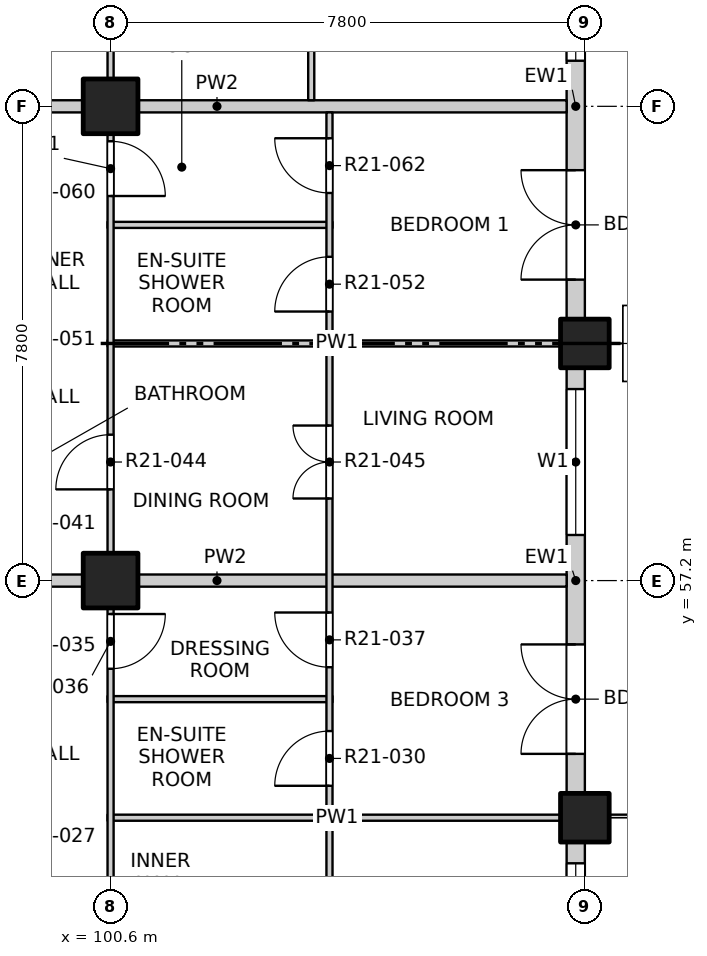
"""IFC4 building model, lengths in metres.
Left out: names, types, materials, properties, quantities, classifications, styles, units other than length and angle.
Written with IfcOpenShell. Run it as: python <this file> out.ifc"""

import sys

from ifc_helpers import new_model, si_unit, direction, frame, frame_2d, origin, origin_2d, place, context, subcontext, project, spatial, rectangle, extrude, element, fill, save


model = new_model("IFC4")
c1 = context("Model", 3, precision=1e-05, world=origin(), true_north=direction((0.0, 1.0)))
c2 = subcontext(c1, "Body", "Model", "MODEL_VIEW")
j1 = project(units=[si_unit("LENGTHUNIT", "METRE"), si_unit("PLANEANGLEUNIT", "RADIAN")], contexts=[c1])
p1 = place(None, origin())
s1 = spatial("IfcSite", under=j1, at=p1, CompositionType="ELEMENT")
p2 = place(p1, origin())
s2 = spatial("IfcBuilding", under=s1, at=p2, CompositionType="ELEMENT")
p3 = place(p2, frame((0.0, 0.0, 221.1)))
s3 = spatial("IfcBuildingStorey", under=s2, at=p3, CompositionType="ELEMENT", Elevation=221.1)
for number, where, z_axis, x_axis in (
    (1, (108.4, 53.3, -0.25), (0.0, 0.0, 1.0), (1.0, 0.0, 0.0)),
    (2, (108.4, 61.1, -0.25), (0.0, 0.0, 1.0), (1.0, 0.0, 0.0)),
):
    element("IfcColumn", number, at=place(p3, frame(where, z_axis=z_axis, x_axis=x_axis)), inside=s3, PredefinedType="COLUMN", context=c2, shape_type="SweptSolid", body=[
        extrude(rectangle(XDim=0.8, YDim=0.8, at=origin_2d()), origin(), (0.0, 0.0, 1.0), 3.4),
    ])
for number, where, z_axis, x_axis in (
    (3, (100.6, 57.2, -0.25), (0.0, 0.0, 1.0), (1.0, 0.0, 0.0)),
    (4, (100.6, 65.0, -0.25), (0.0, 0.0, 1.0), (1.0, 0.0, 0.0)),
):
    element("IfcColumn", number, at=place(p3, frame(where, z_axis=z_axis, x_axis=x_axis)), inside=s3, PredefinedType="COLUMN", context=c2, shape_type="SweptSolid", body=[
        extrude(rectangle(XDim=0.9, YDim=0.9, at=origin_2d()), origin(), (0.0, 0.0, 1.0), 3.4),
    ])
p4 = place(p3, frame((108.25, 45.5, 0.0), z_axis=(0.0, 0.0, 1.0), x_axis=(0.0, 1.0, 0.0)))
e5 = element("IfcWall", 5, at=p4, inside=s3, PredefinedType="SOLIDWALL", context=c2, shape_type="SweptSolid", body=[
    extrude(rectangle(XDim=7.4, YDim=0.3, at=frame_2d((3.7, 0.0))), origin(), (0.0, 0.0, 1.0), 2.7),
])
p5 = place(p4, frame((0.75, 0.0, 0.9)))
e6 = element("IfcOpeningElement", 6, at=p5, cuts=e5, PredefinedType="OPENING", context=c2, shape_type="SweptSolid", body=[
    extrude(rectangle(XDim=2.4, YDim=1.8, at=frame_2d((1.2, 0.9))), frame((0.0, 0.16, 0.0), z_axis=(0.0, -1.0, 0.0), x_axis=(1.0, 0.0, 0.0)), (0.0, 0.0, 1.0), 0.32),
])
p6 = place(p4, frame((4.65, 0.0, 0.9)))
e7 = element("IfcOpeningElement", 7, at=p6, cuts=e5, PredefinedType="OPENING", context=c2, shape_type="SweptSolid", body=[
    extrude(rectangle(XDim=2.4, YDim=1.8, at=frame_2d((1.2, 0.9))), frame((0.0, 0.16, 0.0), z_axis=(0.0, -1.0, 0.0), x_axis=(1.0, 0.0, 0.0)), (0.0, 0.0, 1.0), 0.32),
])
p7 = place(p3, frame((108.25, 53.7, 0.0), z_axis=(0.0, 0.0, 1.0), x_axis=(0.0, 1.0, 0.0)))
e8 = element("IfcWall", 8, at=p7, inside=s3, PredefinedType="SOLIDWALL", context=c2, shape_type="SweptSolid", body=[
    extrude(rectangle(XDim=7.0, YDim=0.3, at=frame_2d((3.5, 0.0))), origin(), (0.0, 0.0, 1.0), 2.7),
])
p8 = place(p7, frame((0.65, 0.0, 0.0)))
e9 = element("IfcOpeningElement", 9, at=p8, cuts=e8, PredefinedType="OPENING", context=c2, shape_type="SweptSolid", body=[
    extrude(rectangle(XDim=1.8, YDim=2.4, at=frame_2d((0.9, 1.2))), frame((0.0, 0.16, 0.0), z_axis=(0.0, -1.0, 0.0), x_axis=(1.0, 0.0, 0.0)), (0.0, 0.0, 1.0), 0.32),
])
p9 = place(p7, frame((4.25, 0.0, 0.9)))
e10 = element("IfcOpeningElement", 10, at=p9, cuts=e8, PredefinedType="OPENING", context=c2, shape_type="SweptSolid", body=[
    extrude(rectangle(XDim=2.4, YDim=1.8, at=frame_2d((1.2, 0.9))), frame((0.0, 0.16, 0.0), z_axis=(0.0, -1.0, 0.0), x_axis=(1.0, 0.0, 0.0)), (0.0, 0.0, 1.0), 0.32),
])
p10 = place(p3, frame((108.25, 61.5, 0.0), z_axis=(0.0, 0.0, 1.0), x_axis=(0.0, 1.0, 0.0)))
e11 = element("IfcWall", 11, at=p10, inside=s3, PredefinedType="SOLIDWALL", context=c2, shape_type="SweptSolid", body=[
    extrude(rectangle(XDim=7.0, YDim=0.3, at=frame_2d((3.5, 0.0))), origin(), (0.0, 0.0, 1.0), 2.7),
])
p11 = place(p10, frame((0.65, 0.0, 0.0)))
e12 = element("IfcOpeningElement", 12, at=p11, cuts=e11, PredefinedType="OPENING", context=c2, shape_type="SweptSolid", body=[
    extrude(rectangle(XDim=1.8, YDim=2.4, at=frame_2d((0.9, 1.2))), frame((0.0, 0.16, 0.0), z_axis=(0.0, -1.0, 0.0), x_axis=(1.0, 0.0, 0.0)), (0.0, 0.0, 1.0), 0.32),
])
p12 = place(p10, frame((4.25, 0.0, 0.9)))
e13 = element("IfcOpeningElement", 13, at=p12, cuts=e11, PredefinedType="OPENING", context=c2, shape_type="SweptSolid", body=[
    extrude(rectangle(XDim=2.4, YDim=1.8, at=frame_2d((1.2, 0.9))), frame((0.0, 0.16, 0.0), z_axis=(0.0, -1.0, 0.0), x_axis=(1.0, 0.0, 0.0)), (0.0, 0.0, 1.0), 0.32),
])
p13 = place(p3, frame((100.55, 53.3, 0.0), z_axis=(0.0, 0.0, 1.0), x_axis=(1.0, 0.0, 0.0)))
e14 = element("IfcWall", 14, at=p13, inside=s3, PredefinedType="PARTITIONING", context=c2, shape_type="SweptSolid", body=[
    extrude(rectangle(XDim=7.55, YDim=0.1, at=frame_2d((3.775, 0.0))), origin(), (0.0, 0.0, 1.0), 3.15),
])
p14 = place(p3, frame((100.55, 55.25, 0.0), z_axis=(0.0, 0.0, 1.0), x_axis=(1.0, 0.0, 0.0)))
e15 = element("IfcWall", 15, at=p14, inside=s3, PredefinedType="PARTITIONING", context=c2, shape_type="SweptSolid", body=[
    extrude(rectangle(XDim=3.7, YDim=0.1, at=frame_2d((1.85, 0.0))), origin(), (0.0, 0.0, 1.0), 3.15),
])
p15 = place(p3, frame((96.6, 57.2, 0.0), z_axis=(0.0, 0.0, 1.0), x_axis=(1.0, 0.0, 0.0)))
e16 = element("IfcWall", 16, at=p15, inside=s3, PredefinedType="PARTITIONING", context=c2, shape_type="SweptSolid", body=[
    extrude(rectangle(XDim=11.5, YDim=0.2, at=frame_2d((5.75, 0.0))), origin(), (0.0, 0.0, 1.0), 3.15),
])
p16 = place(p3, frame((100.55, 61.1, 0.0), z_axis=(0.0, 0.0, 1.0), x_axis=(1.0, 0.0, 0.0)))
e17 = element("IfcWall", 17, at=p16, inside=s3, PredefinedType="PARTITIONING", context=c2, shape_type="SweptSolid", body=[
    extrude(rectangle(XDim=7.55, YDim=0.1, at=frame_2d((3.775, 0.0))), origin(), (0.0, 0.0, 1.0), 2.55),
])
p17 = place(p3, frame((100.55, 63.05, 0.0), z_axis=(0.0, 0.0, 1.0), x_axis=(1.0, 0.0, 0.0)))
e18 = element("IfcWall", 18, at=p17, inside=s3, PredefinedType="PARTITIONING", context=c2, shape_type="SweptSolid", body=[
    extrude(rectangle(XDim=3.7, YDim=0.1, at=frame_2d((1.85, 0.0))), origin(), (0.0, 0.0, 1.0), 3.15),
])
p18 = place(p3, frame((96.6, 65.0, 0.0), z_axis=(0.0, 0.0, 1.0), x_axis=(1.0, 0.0, 0.0)))
e19 = element("IfcWall", 19, at=p18, inside=s3, PredefinedType="PARTITIONING", context=c2, shape_type="SweptSolid", body=[
    extrude(rectangle(XDim=11.5, YDim=0.2, at=frame_2d((5.75, 0.0))), origin(), (0.0, 0.0, 1.0), 3.15),
])
p19 = place(p3, frame((100.6, 41.9, 0.0), z_axis=(0.0, 0.0, 1.0), x_axis=(0.0, 1.0, 0.0)))
e20 = element("IfcWall", 20, at=p19, inside=s3, PredefinedType="PARTITIONING", context=c2, shape_type="SweptSolid", body=[
    extrude(rectangle(XDim=46.2, YDim=0.1, at=frame_2d((23.1, 0.0))), origin(), (0.0, 0.0, 1.0), 3.15),
])
p20 = place(p19, frame((1.2, 0.0, 0.0)))
e21 = element("IfcOpeningElement", 21, at=p20, cuts=e20, PredefinedType="OPENING", context=c2, shape_type="SweptSolid", body=[
    extrude(rectangle(XDim=0.9, YDim=2.1, at=frame_2d((0.45, 1.05))), frame((0.0, 0.06, 0.0), z_axis=(0.0, -1.0, 0.0), x_axis=(1.0, 0.0, 0.0)), (0.0, 0.0, 1.0), 0.12),
])
p21 = place(p19, frame((6.025, 0.0, 0.0)))
e22 = element("IfcOpeningElement", 22, at=p21, cuts=e20, PredefinedType="OPENING", context=c2, shape_type="SweptSolid", body=[
    extrude(rectangle(XDim=0.9, YDim=2.1, at=frame_2d((0.45, 1.05))), frame((0.0, 0.06, 0.0), z_axis=(0.0, -1.0, 0.0), x_axis=(1.0, 0.0, 0.0)), (0.0, 0.0, 1.0), 0.12),
])
p22 = place(p19, frame((9.0, 0.0, 0.0)))
e23 = element("IfcOpeningElement", 23, at=p22, cuts=e20, PredefinedType="OPENING", context=c2, shape_type="SweptSolid", body=[
    extrude(rectangle(XDim=0.9, YDim=2.1, at=frame_2d((0.45, 1.05))), frame((0.0, 0.06, 0.0), z_axis=(0.0, -1.0, 0.0), x_axis=(1.0, 0.0, 0.0)), (0.0, 0.0, 1.0), 0.12),
])
p23 = place(p19, frame((13.85, 0.0, 0.0)))
e24 = element("IfcOpeningElement", 24, at=p23, cuts=e20, PredefinedType="OPENING", context=c2, shape_type="SweptSolid", body=[
    extrude(rectangle(XDim=0.9, YDim=2.1, at=frame_2d((0.45, 1.05))), frame((0.0, 0.06, 0.0), z_axis=(0.0, -1.0, 0.0), x_axis=(1.0, 0.0, 0.0)), (0.0, 0.0, 1.0), 0.12),
])
p24 = place(p19, frame((16.8, 0.0, 0.0)))
e25 = element("IfcOpeningElement", 25, at=p24, cuts=e20, PredefinedType="OPENING", context=c2, shape_type="SweptSolid", body=[
    extrude(rectangle(XDim=0.9, YDim=2.1, at=frame_2d((0.45, 1.05))), frame((0.0, 0.06, 0.0), z_axis=(0.0, -1.0, 0.0), x_axis=(1.0, 0.0, 0.0)), (0.0, 0.0, 1.0), 0.12),
])
p25 = place(p19, frame((21.625, 0.0, 0.0)))
e26 = element("IfcOpeningElement", 26, at=p25, cuts=e20, PredefinedType="OPENING", context=c2, shape_type="SweptSolid", body=[
    extrude(rectangle(XDim=0.9, YDim=2.1, at=frame_2d((0.45, 1.05))), frame((0.0, 0.06, 0.0), z_axis=(0.0, -1.0, 0.0), x_axis=(1.0, 0.0, 0.0)), (0.0, 0.0, 1.0), 0.12),
])
p26 = place(p19, frame((24.6, 0.0, 0.0)))
e27 = element("IfcOpeningElement", 27, at=p26, cuts=e20, PredefinedType="OPENING", context=c2, shape_type="SweptSolid", body=[
    extrude(rectangle(XDim=0.9, YDim=2.1, at=frame_2d((0.45, 1.05))), frame((0.0, 0.06, 0.0), z_axis=(0.0, -1.0, 0.0), x_axis=(1.0, 0.0, 0.0)), (0.0, 0.0, 1.0), 0.12),
])
p27 = place(p19, frame((29.425, 0.0, 0.0)))
e28 = element("IfcOpeningElement", 28, at=p27, cuts=e20, PredefinedType="OPENING", context=c2, shape_type="SweptSolid", body=[
    extrude(rectangle(XDim=0.9, YDim=2.1, at=frame_2d((0.45, 1.05))), frame((0.0, 0.06, 0.0), z_axis=(0.0, -1.0, 0.0), x_axis=(1.0, 0.0, 0.0)), (0.0, 0.0, 1.0), 0.12),
])
p28 = place(p19, frame((33.375, 0.0, 0.0)))
e29 = element("IfcOpeningElement", 29, at=p28, cuts=e20, PredefinedType="OPENING", context=c2, shape_type="SweptSolid", body=[
    extrude(rectangle(XDim=0.9, YDim=2.1, at=frame_2d((0.45, 1.05))), frame((0.0, 0.06, 0.0), z_axis=(0.0, -1.0, 0.0), x_axis=(1.0, 0.0, 0.0)), (0.0, 0.0, 1.0), 0.12),
])
p29 = place(p19, frame((36.3, 0.0, 0.0)))
e30 = element("IfcOpeningElement", 30, at=p29, cuts=e20, PredefinedType="OPENING", context=c2, shape_type="SweptSolid", body=[
    extrude(rectangle(XDim=0.9, YDim=2.1, at=frame_2d((0.45, 1.05))), frame((0.0, 0.06, 0.0), z_axis=(0.0, -1.0, 0.0), x_axis=(1.0, 0.0, 0.0)), (0.0, 0.0, 1.0), 0.12),
])
p30 = place(p19, frame((41.175, 0.0, 0.0)))
e31 = element("IfcOpeningElement", 31, at=p30, cuts=e20, PredefinedType="OPENING", context=c2, shape_type="SweptSolid", body=[
    extrude(rectangle(XDim=0.9, YDim=2.1, at=frame_2d((0.45, 1.05))), frame((0.0, 0.06, 0.0), z_axis=(0.0, -1.0, 0.0), x_axis=(1.0, 0.0, 0.0)), (0.0, 0.0, 1.0), 0.12),
])
p31 = place(p19, frame((44.1, 0.0, 0.0)))
e32 = element("IfcOpeningElement", 32, at=p31, cuts=e20, PredefinedType="OPENING", context=c2, shape_type="SweptSolid", body=[
    extrude(rectangle(XDim=0.9, YDim=2.1, at=frame_2d((0.45, 1.05))), frame((0.0, 0.06, 0.0), z_axis=(0.0, -1.0, 0.0), x_axis=(1.0, 0.0, 0.0)), (0.0, 0.0, 1.0), 0.12),
])
p32 = place(p3, frame((103.9, 65.1, 0.0), z_axis=(0.0, 0.0, 1.0), x_axis=(0.0, 1.0, 0.0)))
e33 = element("IfcWall", 33, at=p32, inside=s3, PredefinedType="PARTITIONING", context=c2, shape_type="SweptSolid", body=[
    extrude(rectangle(XDim=11.5, YDim=0.1, at=frame_2d((5.75, 0.0))), origin(), (0.0, 0.0, 1.0), 3.15),
])
p33 = place(p32, frame((1.25, 0.0, 0.0)))
e34 = element("IfcOpeningElement", 34, at=p33, cuts=e33, PredefinedType="OPENING", context=c2, shape_type="SweptSolid", body=[
    extrude(rectangle(XDim=1.2, YDim=2.1, at=frame_2d((0.6, 1.05))), frame((0.0, 0.06, 0.0), z_axis=(0.0, -1.0, 0.0), x_axis=(1.0, 0.0, 0.0)), (0.0, 0.0, 1.0), 0.12),
])
p34 = place(p32, frame((4.325, 0.0, 0.0)))
e35 = element("IfcOpeningElement", 35, at=p34, cuts=e33, PredefinedType="OPENING", context=c2, shape_type="SweptSolid", body=[
    extrude(rectangle(XDim=0.9, YDim=2.1, at=frame_2d((0.45, 1.05))), frame((0.0, 0.06, 0.0), z_axis=(0.0, -1.0, 0.0), x_axis=(1.0, 0.0, 0.0)), (0.0, 0.0, 1.0), 0.12),
])
p35 = place(p32, frame((6.275, 0.0, 0.0)))
e36 = element("IfcOpeningElement", 36, at=p35, cuts=e33, PredefinedType="OPENING", context=c2, shape_type="SweptSolid", body=[
    extrude(rectangle(XDim=0.9, YDim=2.1, at=frame_2d((0.45, 1.05))), frame((0.0, 0.06, 0.0), z_axis=(0.0, -1.0, 0.0), x_axis=(1.0, 0.0, 0.0)), (0.0, 0.0, 1.0), 0.12),
])
p36 = place(p32, frame((8.225, 0.0, 0.0)))
e37 = element("IfcOpeningElement", 37, at=p36, cuts=e33, PredefinedType="OPENING", context=c2, shape_type="SweptSolid", body=[
    extrude(rectangle(XDim=0.9, YDim=2.1, at=frame_2d((0.45, 1.05))), frame((0.0, 0.06, 0.0), z_axis=(0.0, -1.0, 0.0), x_axis=(1.0, 0.0, 0.0)), (0.0, 0.0, 1.0), 0.12),
])
p37 = place(p32, frame((10.175, 0.0, 0.0)))
e38 = element("IfcOpeningElement", 38, at=p37, cuts=e33, PredefinedType="OPENING", context=c2, shape_type="SweptSolid", body=[
    extrude(rectangle(XDim=0.9, YDim=2.1, at=frame_2d((0.45, 1.05))), frame((0.0, 0.06, 0.0), z_axis=(0.0, -1.0, 0.0), x_axis=(1.0, 0.0, 0.0)), (0.0, 0.0, 1.0), 0.12),
])
p38 = place(p3, frame((104.2, 41.9, 0.0), z_axis=(0.0, 0.0, 1.0), x_axis=(0.0, 1.0, 0.0)))
e39 = element("IfcWall", 39, at=p38, inside=s3, PredefinedType="PARTITIONING", context=c2, shape_type="SweptSolid", body=[
    extrude(rectangle(XDim=23.0, YDim=0.1, at=frame_2d((11.5, 0.0))), origin(), (0.0, 0.0, 1.0), 3.15),
])
p39 = place(p38, frame((1.05, 0.0, 0.0)))
e40 = element("IfcOpeningElement", 40, at=p39, cuts=e39, PredefinedType="OPENING", context=c2, shape_type="SweptSolid", body=[
    extrude(rectangle(XDim=1.2, YDim=2.1, at=frame_2d((0.6, 1.05))), frame((0.0, 0.06, 0.0), z_axis=(0.0, -1.0, 0.0), x_axis=(1.0, 0.0, 0.0)), (0.0, 0.0, 1.0), 0.12),
])
p40 = place(p38, frame((4.125, 0.0, 0.0)))
e41 = element("IfcOpeningElement", 41, at=p40, cuts=e39, PredefinedType="OPENING", context=c2, shape_type="SweptSolid", body=[
    extrude(rectangle(XDim=0.9, YDim=2.1, at=frame_2d((0.45, 1.05))), frame((0.0, 0.06, 0.0), z_axis=(0.0, -1.0, 0.0), x_axis=(1.0, 0.0, 0.0)), (0.0, 0.0, 1.0), 0.12),
])
p41 = place(p38, frame((6.075, 0.0, 0.0)))
e42 = element("IfcOpeningElement", 42, at=p41, cuts=e39, PredefinedType="OPENING", context=c2, shape_type="SweptSolid", body=[
    extrude(rectangle(XDim=0.9, YDim=2.1, at=frame_2d((0.45, 1.05))), frame((0.0, 0.06, 0.0), z_axis=(0.0, -1.0, 0.0), x_axis=(1.0, 0.0, 0.0)), (0.0, 0.0, 1.0), 0.12),
])
p42 = place(p38, frame((8.85, 0.0, 0.0)))
e43 = element("IfcOpeningElement", 43, at=p42, cuts=e39, PredefinedType="OPENING", context=c2, shape_type="SweptSolid", body=[
    extrude(rectangle(XDim=1.2, YDim=2.1, at=frame_2d((0.6, 1.05))), frame((0.0, 0.06, 0.0), z_axis=(0.0, -1.0, 0.0), x_axis=(1.0, 0.0, 0.0)), (0.0, 0.0, 1.0), 0.12),
])
p43 = place(p38, frame((11.925, 0.0, 0.0)))
e44 = element("IfcOpeningElement", 44, at=p43, cuts=e39, PredefinedType="OPENING", context=c2, shape_type="SweptSolid", body=[
    extrude(rectangle(XDim=0.9, YDim=2.1, at=frame_2d((0.45, 1.05))), frame((0.0, 0.06, 0.0), z_axis=(0.0, -1.0, 0.0), x_axis=(1.0, 0.0, 0.0)), (0.0, 0.0, 1.0), 0.12),
])
p44 = place(p38, frame((13.875, 0.0, 0.0)))
e45 = element("IfcOpeningElement", 45, at=p44, cuts=e39, PredefinedType="OPENING", context=c2, shape_type="SweptSolid", body=[
    extrude(rectangle(XDim=0.9, YDim=2.1, at=frame_2d((0.45, 1.05))), frame((0.0, 0.06, 0.0), z_axis=(0.0, -1.0, 0.0), x_axis=(1.0, 0.0, 0.0)), (0.0, 0.0, 1.0), 0.12),
])
p45 = place(p38, frame((16.65, 0.0, 0.0)))
e46 = element("IfcOpeningElement", 46, at=p45, cuts=e39, PredefinedType="OPENING", context=c2, shape_type="SweptSolid", body=[
    extrude(rectangle(XDim=1.2, YDim=2.1, at=frame_2d((0.6, 1.05))), frame((0.0, 0.06, 0.0), z_axis=(0.0, -1.0, 0.0), x_axis=(1.0, 0.0, 0.0)), (0.0, 0.0, 1.0), 0.12),
])
p46 = place(p38, frame((19.725, 0.0, 0.0)))
e47 = element("IfcOpeningElement", 47, at=p46, cuts=e39, PredefinedType="OPENING", context=c2, shape_type="SweptSolid", body=[
    extrude(rectangle(XDim=0.9, YDim=2.1, at=frame_2d((0.45, 1.05))), frame((0.0, 0.06, 0.0), z_axis=(0.0, -1.0, 0.0), x_axis=(1.0, 0.0, 0.0)), (0.0, 0.0, 1.0), 0.12),
])
p47 = place(p38, frame((21.675, 0.0, 0.0)))
e48 = element("IfcOpeningElement", 48, at=p47, cuts=e39, PredefinedType="OPENING", context=c2, shape_type="SweptSolid", body=[
    extrude(rectangle(XDim=0.9, YDim=2.1, at=frame_2d((0.45, 1.05))), frame((0.0, 0.06, 0.0), z_axis=(0.0, -1.0, 0.0), x_axis=(1.0, 0.0, 0.0)), (0.0, 0.0, 1.0), 0.12),
])
p48 = place(p6, origin())
e49 = element("IfcWindow", 49, at=p48, inside=s3, PartitioningType="DOUBLE_PANEL_VERTICAL", PredefinedType="WINDOW", context=c2, shape_type="SweptSolid", body=[
    extrude(rectangle(XDim=2.4, YDim=1.8, at=frame_2d((1.2, 0.9))), frame((0.0, 0.03, 0.0), z_axis=(0.0, -1.0, 0.0), x_axis=(1.0, 0.0, 0.0)), (0.0, 0.0, 1.0), 0.06),
])
fill(e7, e49)
p49 = place(p8, origin())
e50 = element("IfcDoor", 50, at=p49, inside=s3, OperationType="DOUBLE_DOOR_SINGLE_SWING", PredefinedType="DOOR", context=c2, shape_type="SweptSolid", body=[
    extrude(rectangle(XDim=1.8, YDim=2.4, at=frame_2d((0.9, 1.2))), frame((0.0, 0.025, 0.0), z_axis=(0.0, -1.0, 0.0), x_axis=(1.0, 0.0, 0.0)), (0.0, 0.0, 1.0), 0.05),
])
fill(e9, e50)
p50 = place(p9, origin())
e51 = element("IfcWindow", 51, at=p50, inside=s3, PartitioningType="DOUBLE_PANEL_VERTICAL", PredefinedType="WINDOW", context=c2, shape_type="SweptSolid", body=[
    extrude(rectangle(XDim=2.4, YDim=1.8, at=frame_2d((1.2, 0.9))), frame((0.0, 0.03, 0.0), z_axis=(0.0, -1.0, 0.0), x_axis=(1.0, 0.0, 0.0)), (0.0, 0.0, 1.0), 0.06),
])
fill(e10, e51)
p51 = place(p11, origin())
e52 = element("IfcDoor", 52, at=p51, inside=s3, OperationType="DOUBLE_DOOR_SINGLE_SWING", PredefinedType="DOOR", context=c2, shape_type="SweptSolid", body=[
    extrude(rectangle(XDim=1.8, YDim=2.4, at=frame_2d((0.9, 1.2))), frame((0.0, 0.025, 0.0), z_axis=(0.0, -1.0, 0.0), x_axis=(1.0, 0.0, 0.0)), (0.0, 0.0, 1.0), 0.05),
])
fill(e12, e52)
p52 = place(p12, origin())
e53 = element("IfcWindow", 53, at=p52, inside=s3, PartitioningType="DOUBLE_PANEL_VERTICAL", PredefinedType="WINDOW", context=c2, shape_type="SweptSolid", body=[
    extrude(rectangle(XDim=2.4, YDim=1.8, at=frame_2d((1.2, 0.9))), frame((0.0, 0.03, 0.0), z_axis=(0.0, -1.0, 0.0), x_axis=(1.0, 0.0, 0.0)), (0.0, 0.0, 1.0), 0.06),
])
fill(e13, e53)
p53 = place(p43, origin())
e54 = element("IfcDoor", 54, at=p53, inside=s3, OperationType="SINGLE_SWING_LEFT", PredefinedType="DOOR", context=c2, shape_type="SweptSolid", body=[
    extrude(rectangle(XDim=0.9, YDim=2.1, at=frame_2d((0.45, 1.05))), frame((0.0, 0.025, 0.0), z_axis=(0.0, -1.0, 0.0), x_axis=(1.0, 0.0, 0.0)), (0.0, 0.0, 1.0), 0.05),
])
fill(e44, e54)
p54 = place(p23, origin())
e55 = element("IfcDoor", 55, at=p54, inside=s3, OperationType="SINGLE_SWING_LEFT", PredefinedType="DOOR", context=c2, shape_type="SweptSolid", body=[
    extrude(rectangle(XDim=0.9, YDim=2.1, at=frame_2d((0.45, 1.05))), frame((0.0, 0.025, 0.0), z_axis=(0.0, -1.0, 0.0), x_axis=(1.0, 0.0, 0.0)), (0.0, 0.0, 1.0), 0.05),
])
fill(e24, e55)
p55 = place(p44, origin())
e56 = element("IfcDoor", 56, at=p55, inside=s3, OperationType="SINGLE_SWING_RIGHT", PredefinedType="DOOR", context=c2, shape_type="SweptSolid", body=[
    extrude(rectangle(XDim=0.9, YDim=2.1, at=frame_2d((0.45, 1.05))), frame((0.0, 0.025, 0.0), z_axis=(0.0, -1.0, 0.0), x_axis=(1.0, 0.0, 0.0)), (0.0, 0.0, 1.0), 0.05),
])
fill(e45, e56)
p56 = place(p24, origin())
e57 = element("IfcDoor", 57, at=p56, inside=s3, OperationType="SINGLE_SWING_LEFT", PredefinedType="DOOR", context=c2, shape_type="SweptSolid", body=[
    extrude(rectangle(XDim=0.9, YDim=2.1, at=frame_2d((0.45, 1.05))), frame((0.0, 0.025, 0.0), z_axis=(0.0, -1.0, 0.0), x_axis=(1.0, 0.0, 0.0)), (0.0, 0.0, 1.0), 0.05),
])
fill(e25, e57)
p57 = place(p45, origin())
e58 = element("IfcDoor", 58, at=p57, inside=s3, OperationType="DOUBLE_DOOR_SINGLE_SWING", PredefinedType="DOOR", context=c2, shape_type="SweptSolid", body=[
    extrude(rectangle(XDim=1.2, YDim=2.1, at=frame_2d((0.6, 1.05))), frame((0.0, 0.025, 0.0), z_axis=(0.0, -1.0, 0.0), x_axis=(1.0, 0.0, 0.0)), (0.0, 0.0, 1.0), 0.05),
])
fill(e46, e58)
p58 = place(p46, origin())
e59 = element("IfcDoor", 59, at=p58, inside=s3, OperationType="SINGLE_SWING_LEFT", PredefinedType="DOOR", context=c2, shape_type="SweptSolid", body=[
    extrude(rectangle(XDim=0.9, YDim=2.1, at=frame_2d((0.45, 1.05))), frame((0.0, 0.025, 0.0), z_axis=(0.0, -1.0, 0.0), x_axis=(1.0, 0.0, 0.0)), (0.0, 0.0, 1.0), 0.05),
])
fill(e47, e59)
p59 = place(p25, origin())
e60 = element("IfcDoor", 60, at=p59, inside=s3, OperationType="SINGLE_SWING_RIGHT", PredefinedType="DOOR", context=c2, shape_type="SweptSolid", body=[
    extrude(rectangle(XDim=0.9, YDim=2.1, at=frame_2d((0.45, 1.05))), frame((0.0, 0.025, 0.0), z_axis=(0.0, -1.0, 0.0), x_axis=(1.0, 0.0, 0.0)), (0.0, 0.0, 1.0), 0.05),
])
fill(e26, e60)
p60 = place(p47, origin())
e61 = element("IfcDoor", 61, at=p60, inside=s3, OperationType="SINGLE_SWING_RIGHT", PredefinedType="DOOR", context=c2, shape_type="SweptSolid", body=[
    extrude(rectangle(XDim=0.9, YDim=2.1, at=frame_2d((0.45, 1.05))), frame((0.0, 0.025, 0.0), z_axis=(0.0, -1.0, 0.0), x_axis=(1.0, 0.0, 0.0)), (0.0, 0.0, 1.0), 0.05),
])
fill(e48, e61)
save(model, sys.argv[1])
